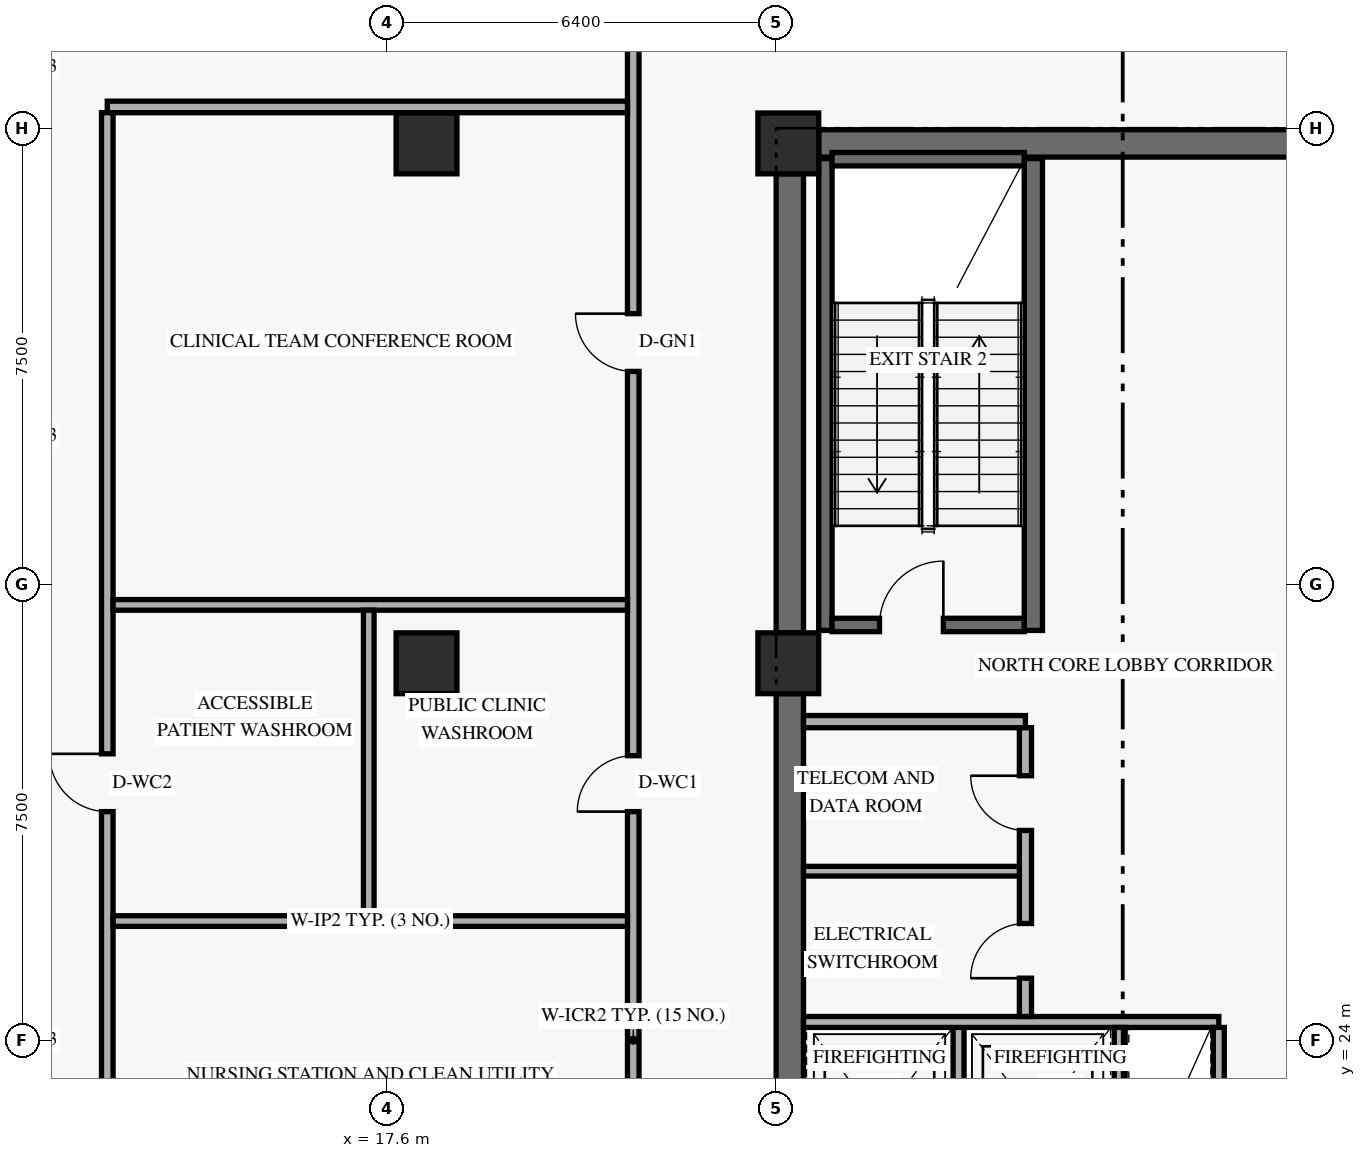
"""IFC4 building model, lengths in metres.
Left out: names, types, materials, properties, quantities, classifications, styles, units other than length and angle.
Written with IfcOpenShell. Run it as: python <this file> out.ifc"""

import sys

from ifc_helpers import new_model, si_unit, direction, frame, frame_2d, origin, origin_2d, place, context, subcontext, project, spatial, rectangle, extrude, element, fill, save


model = new_model("IFC4")
c1 = context("Model", 3, precision=1e-05, world=origin(), true_north=direction((0.0, 1.0)))
c2 = subcontext(c1, "Body", "Model", "MODEL_VIEW")
j1 = project(units=[si_unit("LENGTHUNIT", "METRE"), si_unit("PLANEANGLEUNIT", "RADIAN")], contexts=[c1])
p1 = place(None, origin())
s1 = spatial("IfcSite", under=j1, at=p1, CompositionType="ELEMENT")
p2 = place(p1, origin())
s2 = spatial("IfcBuilding", under=s1, at=p2, CompositionType="ELEMENT")
p3 = place(p2, frame((0.0, 0.0, 9.6)))
s3 = spatial("IfcBuildingStorey", under=s2, at=p3, CompositionType="ELEMENT", Elevation=9.6)
p4 = place(p3, frame((24.225, 18.05, 0.0), z_axis=(0.0, 0.0, 1.0), x_axis=(0.0, 1.0, 0.0)))
e1 = element("IfcWall", 1, at=p4, inside=s3, PredefinedType="SHEAR", context=c2, shape_type="SweptSolid", body=[
    extrude(rectangle(XDim=11.65, YDim=0.45, at=frame_2d((5.825, 0.0))), origin(), (0.0, 0.0, 1.0), 3.75),
])
p5 = place(p3, frame((24.225, 30.7, 0.0), z_axis=(0.0, 0.0, 1.0), x_axis=(0.0, 1.0, 0.0)))
e2 = element("IfcWall", 2, at=p5, inside=s3, PredefinedType="SHEAR", context=c2, shape_type="SweptSolid", body=[
    extrude(rectangle(XDim=7.55, YDim=0.45, at=frame_2d((3.775, 0.0))), origin(), (0.0, 0.0, 1.0), 3.75),
])
p6 = place(p3, frame((24.7, 38.75, 0.0), z_axis=(0.0, 0.0, 1.0), x_axis=(1.0, 0.0, 0.0)))
e3 = element("IfcWall", 3, at=p6, inside=s3, PredefinedType="SHEAR", context=c2, shape_type="SweptSolid", body=[
    extrude(rectangle(XDim=10.0, YDim=0.45, at=frame_2d((5.0, 0.0))), origin(), (0.0, 0.0, 1.0), 4.52),
])
p7 = place(p3, frame((24.81, 30.74, 0.0), z_axis=(0.0, 0.0, 1.0), x_axis=(0.0, 1.0, 0.0)))
e4 = element("IfcWall", 4, at=p7, inside=s3, PredefinedType="SHEAR", context=c2, shape_type="SweptSolid", body=[
    extrude(rectangle(XDim=7.76, YDim=0.22, at=frame_2d((3.88, 0.0))), origin(), (0.0, 0.0, 1.0), 4.52),
])
p8 = place(p3, frame((28.23, 30.74, 0.0), z_axis=(0.0, 0.0, 1.0), x_axis=(0.0, 1.0, 0.0)))
e5 = element("IfcWall", 5, at=p8, inside=s3, PredefinedType="SHEAR", context=c2, shape_type="SweptSolid", body=[
    extrude(rectangle(XDim=7.76, YDim=0.3, at=frame_2d((3.88, 0.0))), origin(), (0.0, 0.0, 1.0), 4.52),
])
p9 = place(p3, frame((24.92, 30.83, 0.0), z_axis=(0.0, 0.0, 1.0), x_axis=(1.0, 0.0, 0.0)))
e6 = element("IfcWall", 6, at=p9, inside=s3, PredefinedType="SHEAR", context=c2, shape_type="SweptSolid", body=[
    extrude(rectangle(XDim=3.16, YDim=0.22, at=frame_2d((1.58, 0.0))), origin(), (0.0, 0.0, 1.0), 4.52),
])
p10 = place(p9, frame((0.78, 0.0, 0.0)))
e7 = element("IfcOpeningElement", 7, at=p10, cuts=e6, PredefinedType="OPENING", context=c2, shape_type="SweptSolid", body=[
    extrude(rectangle(XDim=1.05, YDim=2.15, at=frame_2d((0.525, 1.075))), frame((0.0, 0.12, 0.0), z_axis=(0.0, -1.0, 0.0), x_axis=(1.0, 0.0, 0.0)), (0.0, 0.0, 1.0), 0.24),
])
p11 = place(p3, frame((24.92, 38.49, 0.0), z_axis=(0.0, 0.0, 1.0), x_axis=(1.0, 0.0, 0.0)))
e8 = element("IfcWall", 8, at=p11, inside=s3, PredefinedType="SHEAR", context=c2, shape_type="SweptSolid", body=[
    extrude(rectangle(XDim=3.16, YDim=0.22, at=frame_2d((1.58, 0.0))), origin(), (0.0, 0.0, 1.0), 4.52),
])
for number, where, z_axis, x_axis in (
    (9, (18.25, 30.2, 0.0), (0.0, 0.0, 1.0), (1.0, 0.0, 0.0)),
    (10, (18.25, 38.75, 0.0), (0.0, 0.0, 1.0), (1.0, 0.0, 0.0)),
    (11, (24.2, 30.2, 0.0), (0.0, 0.0, 1.0), (1.0, 0.0, 0.0)),
    (12, (24.2, 38.75, 0.0), (0.0, 0.0, 1.0), (1.0, 0.0, 0.0)),
):
    element("IfcColumn", number, at=place(p3, frame(where, z_axis=z_axis, x_axis=x_axis)), inside=s3, PredefinedType="COLUMN", context=c2, shape_type="SweptSolid", body=[
        extrude(rectangle(XDim=1.0, YDim=1.0, at=origin_2d()), origin(), (0.0, 0.0, 1.0), 4.8),
    ])
p12 = place(p3, frame((27.0, 21.19, 0.0), z_axis=(0.0, 0.0, 1.0), x_axis=(0.0, 1.0, 0.0)))
e13 = element("IfcWall", 13, at=p12, inside=s3, PredefinedType="STANDARD", context=c2, shape_type="SweptSolid", body=[
    extrude(rectangle(XDim=3.11, YDim=0.18, at=frame_2d((1.555, 0.0))), origin(), (0.0, 0.0, 1.0), 4.52),
])
p13 = place(p3, frame((24.45, 24.3, 0.0), z_axis=(0.0, 0.0, 1.0), x_axis=(1.0, 0.0, 0.0)))
e14 = element("IfcWall", 14, at=p13, inside=s3, PredefinedType="STANDARD", context=c2, shape_type="SweptSolid", body=[
    extrude(rectangle(XDim=6.83, YDim=0.18, at=frame_2d((3.415, 0.0))), origin(), (0.0, 0.0, 1.0), 4.52),
])
for number, where, z_axis, x_axis in (
    (15, (29.65, 21.19, 0.0), (0.0, 0.0, 1.0), (0.0, 1.0, 0.0)),
    (16, (31.28, 21.19, 0.0), (0.0, 0.0, 1.0), (0.0, 1.0, 0.0)),
):
    element("IfcWall", number, at=place(p3, frame(where, z_axis=z_axis, x_axis=x_axis)), inside=s3, PredefinedType="STANDARD", context=c2, shape_type="SweptSolid", body=[
        extrude(rectangle(XDim=3.02, YDim=0.18, at=frame_2d((1.51, 0.0))), origin(), (0.0, 0.0, 1.0), 4.52),
    ])
p14 = place(p3, frame((24.45, 29.24, 0.0), z_axis=(0.0, 0.0, 1.0), x_axis=(1.0, 0.0, 0.0)))
e17 = element("IfcWall", 17, at=p14, inside=s3, PredefinedType="STANDARD", context=c2, shape_type="SweptSolid", body=[
    extrude(rectangle(XDim=3.65, YDim=0.2, at=frame_2d((1.825, 0.0))), origin(), (0.0, 0.0, 1.0), 4.52),
])
p15 = place(p3, frame((28.1, 24.39, 0.0), z_axis=(0.0, 0.0, 1.0), x_axis=(0.0, 1.0, 0.0)))
e18 = element("IfcWall", 18, at=p15, inside=s3, PredefinedType="STANDARD", context=c2, shape_type="SweptSolid", body=[
    extrude(rectangle(XDim=4.75, YDim=0.2, at=frame_2d((2.375, 0.0))), origin(), (0.0, 0.0, 1.0), 4.52),
])
p16 = place(p15, frame((0.63, 0.0, 0.0)))
e19 = element("IfcOpeningElement", 19, at=p16, cuts=e18, PredefinedType="OPENING", context=c2, shape_type="SweptSolid", body=[
    extrude(rectangle(XDim=0.9, YDim=2.1, at=frame_2d((0.45, 1.05))), frame((0.0, 0.11, 0.0), z_axis=(0.0, -1.0, 0.0), x_axis=(1.0, 0.0, 0.0)), (0.0, 0.0, 1.0), 0.22),
])
p17 = place(p15, frame((3.06, 0.0, 0.0)))
e20 = element("IfcOpeningElement", 20, at=p17, cuts=e18, PredefinedType="OPENING", context=c2, shape_type="SweptSolid", body=[
    extrude(rectangle(XDim=0.9, YDim=2.1, at=frame_2d((0.45, 1.05))), frame((0.0, 0.11, 0.0), z_axis=(0.0, -1.0, 0.0), x_axis=(1.0, 0.0, 0.0)), (0.0, 0.0, 1.0), 0.22),
])
p18 = place(p3, frame((24.45, 26.78, 0.0), z_axis=(0.0, 0.0, 1.0), x_axis=(1.0, 0.0, 0.0)))
e21 = element("IfcWall", 21, at=p18, inside=s3, PredefinedType="PARTITIONING", context=c2, shape_type="SweptSolid", body=[
    extrude(rectangle(XDim=3.55, YDim=0.16, at=frame_2d((1.775, 0.0))), origin(), (0.0, 0.0, 1.0), 4.52),
])
p19 = place(p3, frame((21.65, 6.8, 0.0), z_axis=(0.0, 0.0, 1.0), x_axis=(0.0, 1.0, 0.0)))
e22 = element("IfcWall", 22, at=p19, inside=s3, PredefinedType="STANDARD", context=c2, shape_type="SweptSolid", body=[
    extrude(rectangle(XDim=34.4, YDim=0.19, at=frame_2d((17.2, 0.0))), origin(), (0.0, 0.0, 1.0), 3.575),
])
p20 = place(p19, frame((20.96, 0.0, 0.0)))
e23 = element("IfcOpeningElement", 23, at=p20, cuts=e22, PredefinedType="OPENING", context=c2, shape_type="SweptSolid", body=[
    extrude(rectangle(XDim=0.92, YDim=2.14, at=frame_2d((0.46, 1.07))), frame((0.0, 0.105, 0.0), z_axis=(0.0, -1.0, 0.0), x_axis=(1.0, 0.0, 0.0)), (0.0, 0.0, 1.0), 0.21),
])
p21 = place(p19, frame((28.2, 0.0, 0.0)))
e24 = element("IfcOpeningElement", 24, at=p21, cuts=e22, PredefinedType="OPENING", context=c2, shape_type="SweptSolid", body=[
    extrude(rectangle(XDim=0.95, YDim=2.15, at=frame_2d((0.475, 1.075))), frame((0.0, 0.105, 0.0), z_axis=(0.0, -1.0, 0.0), x_axis=(1.0, 0.0, 0.0)), (0.0, 0.0, 1.0), 0.21),
])
p22 = place(p19, frame((6.0, 0.0, 0.0)))
e25 = element("IfcOpeningElement", 25, at=p22, cuts=e22, PredefinedType="OPENING", context=c2, shape_type="SweptSolid", body=[
    extrude(rectangle(XDim=0.9, YDim=2.1, at=frame_2d((0.45, 1.05))), frame((0.0, 0.105, 0.0), z_axis=(0.0, -1.0, 0.0), x_axis=(1.0, 0.0, 0.0)), (0.0, 0.0, 1.0), 0.21),
])
p23 = place(p3, frame((13.0, 39.35, 0.0), z_axis=(0.0, 0.0, 1.0), x_axis=(1.0, 0.0, 0.0)))
e26 = element("IfcWall", 26, at=p23, inside=s3, PredefinedType="STANDARD", context=c2, shape_type="SweptSolid", body=[
    extrude(rectangle(XDim=8.555, YDim=0.19, at=frame_2d((4.277, 0.0))), origin(), (0.0, 0.0, 1.0), 3.732),
])
p24 = place(p3, frame((13.0, 20.18, 0.0), z_axis=(0.0, 0.0, 1.0), x_axis=(0.0, 1.0, 0.0)))
e27 = element("IfcWall", 27, at=p24, inside=s3, PredefinedType="STANDARD", context=c2, shape_type="SweptSolid", body=[
    extrude(rectangle(XDim=19.075, YDim=0.19, at=frame_2d((9.538, 0.0))), origin(), (0.0, 0.0, 1.0), 3.575),
])
p25 = place(p24, frame((1.8, 0.0, 0.0)))
e28 = element("IfcOpeningElement", 28, at=p25, cuts=e27, PredefinedType="OPENING", context=c2, shape_type="SweptSolid", body=[
    extrude(rectangle(XDim=0.95, YDim=2.15, at=frame_2d((0.475, 1.075))), frame((0.0, 0.105, 0.0), z_axis=(0.0, -1.0, 0.0), x_axis=(1.0, 0.0, 0.0)), (0.0, 0.0, 1.0), 0.21),
])
p26 = place(p24, frame((7.58, 0.0, 0.0)))
e29 = element("IfcOpeningElement", 29, at=p26, cuts=e27, PredefinedType="OPENING", context=c2, shape_type="SweptSolid", body=[
    extrude(rectangle(XDim=0.95, YDim=2.14, at=frame_2d((0.475, 1.07))), frame((0.0, 0.105, 0.0), z_axis=(0.0, -1.0, 0.0), x_axis=(1.0, 0.0, 0.0)), (0.0, 0.0, 1.0), 0.21),
])
for number, where, z_axis, x_axis in (
    (30, (13.095, 25.96, 0.0), (0.0, 0.0, 1.0), (1.0, 0.0, 0.0)),
    (31, (13.095, 31.16, 0.0), (0.0, 0.0, 1.0), (1.0, 0.0, 0.0)),
):
    element("IfcWall", number, at=place(p3, frame(where, z_axis=z_axis, x_axis=x_axis)), inside=s3, PredefinedType="PLUMBINGWALL", context=c2, shape_type="SweptSolid", body=[
        extrude(rectangle(XDim=8.46, YDim=0.175, at=frame_2d((4.23, 0.0))), origin(), (0.0, 0.0, 1.0), 3.732),
    ])
p27 = place(p3, frame((17.3, 26.048, 0.0), z_axis=(0.0, 0.0, 1.0), x_axis=(0.0, 1.0, 0.0)))
e32 = element("IfcWall", 32, at=p27, inside=s3, PredefinedType="PLUMBINGWALL", context=c2, shape_type="SweptSolid", body=[
    extrude(rectangle(XDim=5.025, YDim=0.175, at=frame_2d((2.512, 0.0))), origin(), (0.0, 0.0, 1.0), 3.575),
])
p28 = place(p10, origin())
e33 = element("IfcDoor", 33, at=p28, inside=s3, OperationType="SINGLE_SWING_RIGHT", PredefinedType="DOOR", context=c2, shape_type="SweptSolid", body=[
    extrude(rectangle(XDim=1.05, YDim=2.15, at=frame_2d((0.525, 1.075))), frame((0.0, 0.025, 0.0), z_axis=(0.0, -1.0, 0.0), x_axis=(1.0, 0.0, 0.0)), (0.0, 0.0, 1.0), 0.05),
])
fill(e7, e33)
p29 = place(p16, origin())
e34 = element("IfcDoor", 34, at=p29, inside=s3, OperationType="SINGLE_SWING_LEFT", PredefinedType="DOOR", context=c2, shape_type="SweptSolid", body=[
    extrude(rectangle(XDim=0.9, YDim=2.1, at=frame_2d((0.45, 1.05))), frame((0.0, 0.025, 0.0), z_axis=(0.0, -1.0, 0.0), x_axis=(1.0, 0.0, 0.0)), (0.0, 0.0, 1.0), 0.05),
])
fill(e19, e34)
p30 = place(p17, origin())
e35 = element("IfcDoor", 35, at=p30, inside=s3, OperationType="SINGLE_SWING_RIGHT", PredefinedType="DOOR", context=c2, shape_type="SweptSolid", body=[
    extrude(rectangle(XDim=0.9, YDim=2.1, at=frame_2d((0.45, 1.05))), frame((0.0, 0.025, 0.0), z_axis=(0.0, -1.0, 0.0), x_axis=(1.0, 0.0, 0.0)), (0.0, 0.0, 1.0), 0.05),
])
fill(e20, e35)
p31 = place(p26, origin())
e36 = element("IfcDoor", 36, at=p31, inside=s3, OperationType="SINGLE_SWING_RIGHT", PredefinedType="DOOR", context=c2, shape_type="SweptSolid", body=[
    extrude(rectangle(XDim=0.95, YDim=2.14, at=frame_2d((0.475, 1.07))), frame((0.0, 0.025, 0.0), z_axis=(0.0, -1.0, 0.0), x_axis=(1.0, 0.0, 0.0)), (0.0, 0.0, 1.0), 0.05),
])
fill(e29, e36)
p32 = place(p20, origin())
e37 = element("IfcDoor", 37, at=p32, inside=s3, OperationType="SINGLE_SWING_LEFT", PredefinedType="DOOR", context=c2, shape_type="SweptSolid", body=[
    extrude(rectangle(XDim=0.92, YDim=2.14, at=frame_2d((0.46, 1.07))), frame((0.0, 0.025, 0.0), z_axis=(0.0, -1.0, 0.0), x_axis=(1.0, 0.0, 0.0)), (0.0, 0.0, 1.0), 0.05),
])
fill(e23, e37)
p33 = place(p21, origin())
e38 = element("IfcDoor", 38, at=p33, inside=s3, OperationType="SINGLE_SWING_RIGHT", PredefinedType="DOOR", context=c2, shape_type="SweptSolid", body=[
    extrude(rectangle(XDim=0.95, YDim=2.15, at=frame_2d((0.475, 1.075))), frame((0.0, 0.025, 0.0), z_axis=(0.0, -1.0, 0.0), x_axis=(1.0, 0.0, 0.0)), (0.0, 0.0, 1.0), 0.05),
])
fill(e24, e38)
save(model, sys.argv[1])
